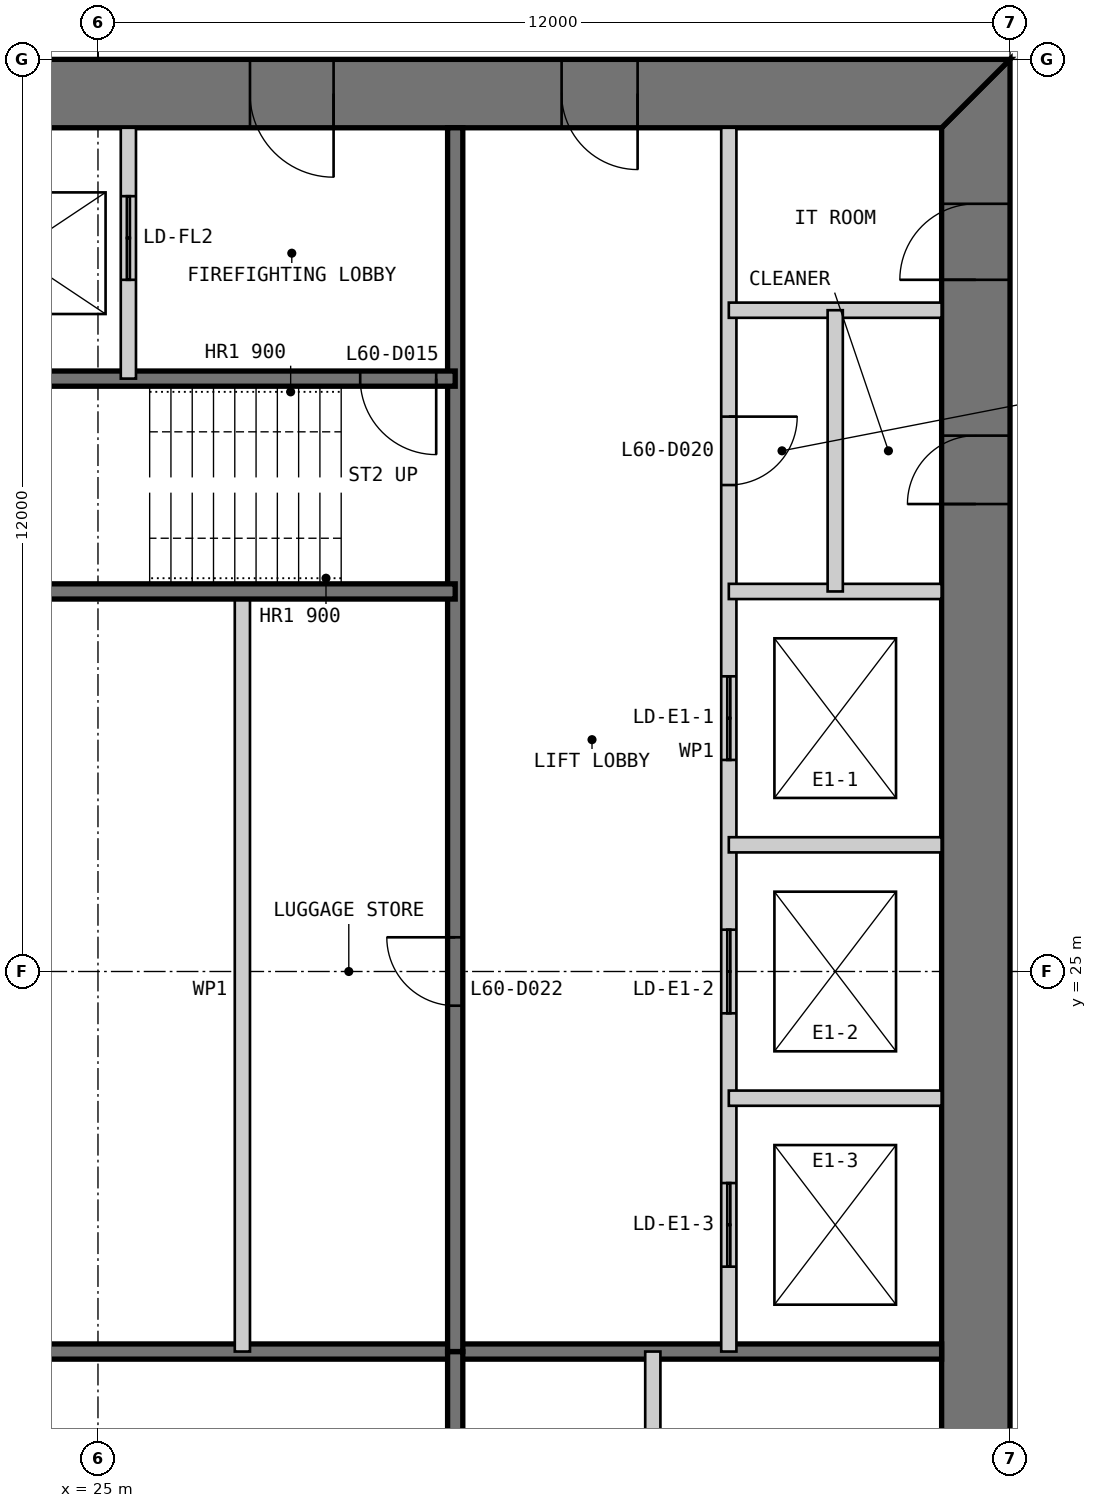
"""IFC4 building model, lengths in metres.
Left out: names, types, materials, properties, quantities, classifications, styles, units other than length and angle.
Written with IfcOpenShell. Run it as: python <this file> out.ifc"""

import sys

from ifc_helpers import new_model, si_unit, direction, frame, frame_2d, origin, place, context, subcontext, project, spatial, polyline, rectangle, outline, extrude, element, fill, save


model = new_model("IFC4")
c1 = context("Model", 3, precision=1e-05, world=origin(), true_north=direction((0.0, 1.0)))
c2 = subcontext(c1, "Body", "Model", "MODEL_VIEW")
j1 = project(units=[si_unit("LENGTHUNIT", "METRE"), si_unit("PLANEANGLEUNIT", "RADIAN")], contexts=[c1])
p1 = place(None, origin())
s1 = spatial("IfcSite", under=j1, at=p1, CompositionType="ELEMENT")
p2 = place(p1, origin())
s2 = spatial("IfcBuilding", under=s1, at=p2, CompositionType="ELEMENT")
p3 = place(p2, frame((0.0, 0.0, 256.0)))
s3 = spatial("IfcBuildingStorey", under=s2, at=p3, CompositionType="ELEMENT", Elevation=256.0)
p4 = place(p3, frame((36.55, 13.9, 0.0), z_axis=(0.0, 0.0, 1.0), x_axis=(0.0, 1.0, 0.0)))
e1 = element("IfcWall", 1, at=p4, inside=s3, PredefinedType="SHEAR", context=c2, shape_type="SweptSolid", body=[
    extrude(outline(polyline([(-0.9, -0.45), (23.1, -0.45), (22.2, 0.45), (0.0, 0.45), (-0.9, -0.45)])), origin(), (0.0, 0.0, 1.0), 3.4),
])
p5 = place(p4, frame((20.2, 0.0, 0.0)))
e2 = element("IfcOpeningElement", 2, at=p5, cuts=e1, PredefinedType="OPENING", context=c2, shape_type="SweptSolid", body=[
    extrude(rectangle(XDim=1.0, YDim=2.2, at=frame_2d((0.5, 1.1))), frame((0.0, 0.46, 0.0), z_axis=(0.0, -1.0, 0.0), x_axis=(1.0, 0.0, 0.0)), (0.0, 0.0, 1.0), 0.92),
])
p6 = place(p4, frame((17.25, 0.0, 0.0)))
e3 = element("IfcOpeningElement", 3, at=p6, cuts=e1, PredefinedType="OPENING", context=c2, shape_type="SweptSolid", body=[
    extrude(rectangle(XDim=0.9, YDim=2.2, at=frame_2d((0.45, 1.1))), frame((0.0, 0.46, 0.0), z_axis=(0.0, -1.0, 0.0), x_axis=(1.0, 0.0, 0.0)), (0.0, 0.0, 1.0), 0.92),
])
p7 = place(p3, frame((37.0, 36.55, 0.0), z_axis=(0.0, 0.0, 1.0), x_axis=(-1.0, 0.0, 0.0)))
e4 = element("IfcWall", 4, at=p7, inside=s3, PredefinedType="SHEAR", context=c2, shape_type="SweptSolid", body=[
    extrude(outline(polyline([(0.0, -0.45), (24.0, -0.45), (23.1, 0.45), (0.9, 0.45), (0.0, -0.45)])), origin(), (0.0, 0.0, 1.0), 3.4),
])
p8 = place(p7, frame((4.9, 0.0, 0.0)))
e5 = element("IfcOpeningElement", 5, at=p8, cuts=e4, PredefinedType="OPENING", context=c2, shape_type="SweptSolid", body=[
    extrude(rectangle(XDim=1.0, YDim=2.2, at=frame_2d((0.5, 1.1))), frame((0.0, 0.46, 0.0), z_axis=(0.0, -1.0, 0.0), x_axis=(1.0, 0.0, 0.0)), (0.0, 0.0, 1.0), 0.92),
])
p9 = place(p7, frame((8.9, 0.0, 0.0)))
e6 = element("IfcOpeningElement", 6, at=p9, cuts=e4, PredefinedType="OPENING", context=c2, shape_type="SweptSolid", body=[
    extrude(rectangle(XDim=1.1, YDim=2.2, at=frame_2d((0.55, 1.1))), frame((0.0, 0.46, 0.0), z_axis=(0.0, -1.0, 0.0), x_axis=(1.0, 0.0, 0.0)), (0.0, 0.0, 1.0), 0.92),
])
p10 = place(p7, frame((15.05, 0.0, 0.0)))
e7 = element("IfcOpeningElement", 7, at=p10, cuts=e4, PredefinedType="OPENING", context=c2, shape_type="SweptSolid", body=[
    extrude(rectangle(XDim=0.9, YDim=2.2, at=frame_2d((0.45, 1.1))), frame((0.0, 0.46, 0.0), z_axis=(0.0, -1.0, 0.0), x_axis=(1.0, 0.0, 0.0)), (0.0, 0.0, 1.0), 0.92),
])
p11 = place(p7, frame((17.9, 0.0, 0.0)))
e8 = element("IfcOpeningElement", 8, at=p11, cuts=e4, PredefinedType="OPENING", context=c2, shape_type="SweptSolid", body=[
    extrude(rectangle(XDim=1.0, YDim=2.2, at=frame_2d((0.5, 1.1))), frame((0.0, 0.46, 0.0), z_axis=(0.0, -1.0, 0.0), x_axis=(1.0, 0.0, 0.0)), (0.0, 0.0, 1.0), 0.92),
])
p12 = place(p7, frame((21.4, 0.0, 0.0)))
e9 = element("IfcOpeningElement", 9, at=p12, cuts=e4, PredefinedType="OPENING", context=c2, shape_type="SweptSolid", body=[
    extrude(rectangle(XDim=1.0, YDim=2.2, at=frame_2d((0.5, 1.1))), frame((0.0, 0.46, 0.0), z_axis=(0.0, -1.0, 0.0), x_axis=(1.0, 0.0, 0.0)), (0.0, 0.0, 1.0), 0.92),
])
p13 = place(p3, frame((20.3, 20.0, 0.0), z_axis=(0.0, 0.0, 1.0), x_axis=(1.0, 0.0, 0.0)))
e10 = element("IfcWall", 10, at=p13, inside=s3, PredefinedType="SOLIDWALL", context=c2, shape_type="SweptSolid", body=[
    extrude(rectangle(XDim=15.8, YDim=0.2, at=frame_2d((7.9, 0.0))), origin(), (0.0, 0.0, 1.0), 3.2),
])
p14 = place(p3, frame((29.7, 13.9, 0.0), z_axis=(0.0, 0.0, 1.0), x_axis=(0.0, 1.0, 0.0)))
e11 = element("IfcWall", 11, at=p14, inside=s3, PredefinedType="SOLIDWALL", context=c2, shape_type="SweptSolid", body=[
    extrude(rectangle(XDim=6.1, YDim=0.2, at=frame_2d((3.05, 0.0))), origin(), (0.0, 0.0, 1.0), 3.2),
])
p15 = place(p3, frame((32.3, 13.9, 0.0), z_axis=(0.0, 0.0, 1.0), x_axis=(0.0, 1.0, 0.0)))
e12 = element("IfcWall", 12, at=p15, inside=s3, PredefinedType="PARTITIONING", context=c2, shape_type="SweptSolid", body=[
    extrude(rectangle(XDim=6.1, YDim=0.2, at=frame_2d((3.05, 0.0))), origin(), (0.0, 0.0, 1.0), 3.2),
])
p16 = place(p3, frame((33.3, 36.1, 0.0), z_axis=(0.0, 0.0, 1.0), x_axis=(0.0, -1.0, 0.0)))
e13 = element("IfcWall", 13, at=p16, inside=s3, PredefinedType="PARTITIONING", context=c2, shape_type="SweptSolid", body=[
    extrude(rectangle(XDim=16.1, YDim=0.2, at=frame_2d((8.05, 0.0))), origin(), (0.0, 0.0, 1.0), 3.2),
])
p17 = place(p16, frame((3.8, 0.0, 0.0)))
e14 = element("IfcOpeningElement", 14, at=p17, cuts=e13, PredefinedType="OPENING", context=c2, shape_type="SweptSolid", body=[
    extrude(rectangle(XDim=0.9, YDim=2.2, at=frame_2d((0.45, 1.1))), frame((0.0, 0.11, 0.0), z_axis=(0.0, -1.0, 0.0), x_axis=(1.0, 0.0, 0.0)), (0.0, 0.0, 1.0), 0.22),
])
p18 = place(p16, frame((7.217, 0.0, 0.0)))
e15 = element("IfcOpeningElement", 15, at=p18, cuts=e13, PredefinedType="OPENING", context=c2, shape_type="SweptSolid", body=[
    extrude(rectangle(XDim=1.1, YDim=2.2, at=frame_2d((0.55, 1.1))), frame((0.0, 0.11, 0.0), z_axis=(0.0, -1.0, 0.0), x_axis=(1.0, 0.0, 0.0)), (0.0, 0.0, 1.0), 0.22),
])
p19 = place(p16, frame((10.55, 0.0, 0.0)))
e16 = element("IfcOpeningElement", 16, at=p19, cuts=e13, PredefinedType="OPENING", context=c2, shape_type="SweptSolid", body=[
    extrude(rectangle(XDim=1.1, YDim=2.2, at=frame_2d((0.55, 1.1))), frame((0.0, 0.11, 0.0), z_axis=(0.0, -1.0, 0.0), x_axis=(1.0, 0.0, 0.0)), (0.0, 0.0, 1.0), 0.22),
])
p20 = place(p16, frame((13.883, 0.0, 0.0)))
e17 = element("IfcOpeningElement", 17, at=p20, cuts=e13, PredefinedType="OPENING", context=c2, shape_type="SweptSolid", body=[
    extrude(rectangle(XDim=1.1, YDim=2.2, at=frame_2d((0.55, 1.1))), frame((0.0, 0.11, 0.0), z_axis=(0.0, -1.0, 0.0), x_axis=(1.0, 0.0, 0.0)), (0.0, 0.0, 1.0), 0.22),
])
p21 = place(p3, frame((29.7, 36.1, 0.0), z_axis=(0.0, 0.0, 1.0), x_axis=(0.0, -1.0, 0.0)))
e18 = element("IfcWall", 18, at=p21, inside=s3, PredefinedType="SOLIDWALL", context=c2, shape_type="SweptSolid", body=[
    extrude(rectangle(XDim=16.1, YDim=0.2, at=frame_2d((8.05, 0.0))), origin(), (0.0, 0.0, 1.0), 3.2),
])
p22 = place(p21, frame((10.65, 0.0, 0.0)))
e19 = element("IfcOpeningElement", 19, at=p22, cuts=e18, PredefinedType="OPENING", context=c2, shape_type="SweptSolid", body=[
    extrude(rectangle(XDim=0.9, YDim=2.2, at=frame_2d((0.45, 1.1))), frame((0.0, 0.11, 0.0), z_axis=(0.0, -1.0, 0.0), x_axis=(1.0, 0.0, 0.0)), (0.0, 0.0, 1.0), 0.22),
])
for number, where, z_axis, x_axis in (
    (20, (36.1, 30.0, 0.0), (0.0, 0.0, 1.0), (-1.0, 0.0, 0.0)),
    (21, (36.1, 26.667, 0.0), (0.0, 0.0, 1.0), (-1.0, 0.0, 0.0)),
    (22, (36.1, 23.333, 0.0), (0.0, 0.0, 1.0), (-1.0, 0.0, 0.0)),
):
    element("IfcWall", number, at=place(p3, frame(where, z_axis=z_axis, x_axis=x_axis)), inside=s3, PredefinedType="PARTITIONING", context=c2, shape_type="SweptSolid", body=[
        extrude(rectangle(XDim=2.8, YDim=0.2, at=frame_2d((1.4, 0.0))), origin(), (0.0, 0.0, 1.0), 3.2),
    ])
p23 = place(p3, frame((26.9, 30.0, 0.0), z_axis=(0.0, 0.0, 1.0), x_axis=(0.0, -1.0, 0.0)))
e23 = element("IfcWall", 23, at=p23, inside=s3, PredefinedType="PARTITIONING", context=c2, shape_type="SweptSolid", body=[
    extrude(rectangle(XDim=10.0, YDim=0.2, at=frame_2d((5.0, 0.0))), origin(), (0.0, 0.0, 1.0), 3.2),
])
p24 = place(p3, frame((29.7, 32.8, 0.0), z_axis=(0.0, 0.0, 1.0), x_axis=(-1.0, 0.0, 0.0)))
e24 = element("IfcWall", 24, at=p24, inside=s3, PredefinedType="SOLIDWALL", context=c2, shape_type="SweptSolid", body=[
    extrude(rectangle(XDim=9.4, YDim=0.2, at=frame_2d((4.7, 0.0))), origin(), (0.0, 0.0, 1.0), 3.2),
])
p25 = place(p24, frame((0.25, 0.0, 0.0)))
e25 = element("IfcOpeningElement", 25, at=p25, cuts=e24, PredefinedType="OPENING", context=c2, shape_type="SweptSolid", body=[
    extrude(rectangle(XDim=1.0, YDim=2.2, at=frame_2d((0.5, 1.1))), frame((0.0, 0.11, 0.0), z_axis=(0.0, -1.0, 0.0), x_axis=(1.0, 0.0, 0.0)), (0.0, 0.0, 1.0), 0.22),
])
p26 = place(p3, frame((29.7, 30.0, 0.0), z_axis=(0.0, 0.0, 1.0), x_axis=(-1.0, 0.0, 0.0)))
e26 = element("IfcWall", 26, at=p26, inside=s3, PredefinedType="SOLIDWALL", context=c2, shape_type="SweptSolid", body=[
    extrude(rectangle(XDim=15.8, YDim=0.2, at=frame_2d((7.9, 0.0))), origin(), (0.0, 0.0, 1.0), 3.2),
])
p27 = place(p3, frame((25.4, 36.1, 0.0), z_axis=(0.0, 0.0, 1.0), x_axis=(0.0, -1.0, 0.0)))
e27 = element("IfcWall", 27, at=p27, inside=s3, PredefinedType="PARTITIONING", context=c2, shape_type="SweptSolid", body=[
    extrude(rectangle(XDim=3.3, YDim=0.2, at=frame_2d((1.65, 0.0))), origin(), (0.0, 0.0, 1.0), 3.2),
])
p28 = place(p27, frame((0.9, 0.0, 0.0)))
e28 = element("IfcOpeningElement", 28, at=p28, cuts=e27, PredefinedType="OPENING", context=c2, shape_type="SweptSolid", body=[
    extrude(rectangle(XDim=1.1, YDim=2.2, at=frame_2d((0.55, 1.1))), frame((0.0, 0.11, 0.0), z_axis=(0.0, -1.0, 0.0), x_axis=(1.0, 0.0, 0.0)), (0.0, 0.0, 1.0), 0.22),
])
p29 = place(p3, frame((36.1, 33.7, 0.0), z_axis=(0.0, 0.0, 1.0), x_axis=(-1.0, 0.0, 0.0)))
e29 = element("IfcWall", 29, at=p29, inside=s3, PredefinedType="PARTITIONING", context=c2, shape_type="SweptSolid", body=[
    extrude(rectangle(XDim=2.8, YDim=0.2, at=frame_2d((1.4, 0.0))), origin(), (0.0, 0.0, 1.0), 3.2),
])
p30 = place(p3, frame((34.7, 33.7, 0.0), z_axis=(0.0, 0.0, 1.0), x_axis=(0.0, -1.0, 0.0)))
e30 = element("IfcWall", 30, at=p30, inside=s3, PredefinedType="PARTITIONING", context=c2, shape_type="SweptSolid", body=[
    extrude(rectangle(XDim=3.7, YDim=0.2, at=frame_2d((1.85, 0.0))), origin(), (0.0, 0.0, 1.0), 3.2),
])
p31 = place(p8, origin())
e31 = element("IfcDoor", 31, at=p31, inside=s3, OperationType="SINGLE_SWING_LEFT", PredefinedType="DOOR", context=c2, shape_type="SweptSolid", body=[
    extrude(rectangle(XDim=1.0, YDim=2.2, at=frame_2d((0.5, 1.1))), frame((0.0, 0.025, 0.0), z_axis=(0.0, -1.0, 0.0), x_axis=(1.0, 0.0, 0.0)), (0.0, 0.0, 1.0), 0.05),
    extrude(outline(polyline([(0.0, 0.0), (0.04, 0.0), (0.04, 2.16), (0.96, 2.16), (0.96, 0.0), (1.0, 0.0), (1.0, 2.2), (0.0, 2.2), (0.0, 0.0)])), frame((0.0, 0.3, 0.0), z_axis=(0.0, -1.0, 0.0), x_axis=(1.0, 0.0, 0.0)), (0.0, 0.0, 1.0), 0.6),
])
fill(e5, e31)
p32 = place(p9, origin())
e32 = element("IfcDoor", 32, at=p32, inside=s3, OperationType="SINGLE_SWING_LEFT", PredefinedType="DOOR", context=c2, shape_type="SweptSolid", body=[
    extrude(rectangle(XDim=1.1, YDim=2.2, at=frame_2d((0.55, 1.1))), frame((0.0, 0.025, 0.0), z_axis=(0.0, -1.0, 0.0), x_axis=(1.0, 0.0, 0.0)), (0.0, 0.0, 1.0), 0.05),
    extrude(outline(polyline([(0.0, 0.0), (0.04, 0.0), (0.04, 2.16), (1.06, 2.16), (1.06, 0.0), (1.1, 0.0), (1.1, 2.2), (0.0, 2.2), (0.0, 0.0)])), frame((0.0, 0.3, 0.0), z_axis=(0.0, -1.0, 0.0), x_axis=(1.0, 0.0, 0.0)), (0.0, 0.0, 1.0), 0.6),
])
fill(e6, e32)
p33 = place(p25, origin())
e33 = element("IfcDoor", 33, at=p33, inside=s3, OperationType="SINGLE_SWING_LEFT", PredefinedType="DOOR", context=c2, shape_type="SweptSolid", body=[
    extrude(rectangle(XDim=1.0, YDim=2.2, at=frame_2d((0.5, 1.1))), frame((0.0, 0.025, 0.0), z_axis=(0.0, -1.0, 0.0), x_axis=(1.0, 0.0, 0.0)), (0.0, 0.0, 1.0), 0.05),
])
fill(e25, e33)
p34 = place(p5, origin())
e34 = element("IfcDoor", 34, at=p34, inside=s3, OperationType="SINGLE_SWING_LEFT", PredefinedType="DOOR", context=c2, shape_type="SweptSolid", body=[
    extrude(rectangle(XDim=1.0, YDim=2.2, at=frame_2d((0.5, 1.1))), frame((0.0, 0.025, 0.0), z_axis=(0.0, -1.0, 0.0), x_axis=(1.0, 0.0, 0.0)), (0.0, 0.0, 1.0), 0.05),
    extrude(outline(polyline([(0.0, 0.0), (0.04, 0.0), (0.04, 2.16), (0.96, 2.16), (0.96, 0.0), (1.0, 0.0), (1.0, 2.2), (0.0, 2.2), (0.0, 0.0)])), frame((0.0, 0.3, 0.0), z_axis=(0.0, -1.0, 0.0), x_axis=(1.0, 0.0, 0.0)), (0.0, 0.0, 1.0), 0.6),
])
fill(e2, e34)
p35 = place(p17, origin())
e35 = element("IfcDoor", 35, at=p35, inside=s3, OperationType="SINGLE_SWING_LEFT", PredefinedType="DOOR", context=c2, shape_type="SweptSolid", body=[
    extrude(rectangle(XDim=0.9, YDim=2.2, at=frame_2d((0.45, 1.1))), frame((0.0, 0.025, 0.0), z_axis=(0.0, -1.0, 0.0), x_axis=(1.0, 0.0, 0.0)), (0.0, 0.0, 1.0), 0.05),
])
fill(e14, e35)
p36 = place(p6, origin())
e36 = element("IfcDoor", 36, at=p36, inside=s3, OperationType="SINGLE_SWING_LEFT", PredefinedType="DOOR", context=c2, shape_type="SweptSolid", body=[
    extrude(rectangle(XDim=0.9, YDim=2.2, at=frame_2d((0.45, 1.1))), frame((0.0, 0.025, 0.0), z_axis=(0.0, -1.0, 0.0), x_axis=(1.0, 0.0, 0.0)), (0.0, 0.0, 1.0), 0.05),
    extrude(outline(polyline([(0.0, 0.0), (0.04, 0.0), (0.04, 2.16), (0.86, 2.16), (0.86, 0.0), (0.9, 0.0), (0.9, 2.2), (0.0, 2.2), (0.0, 0.0)])), frame((0.0, 0.3, 0.0), z_axis=(0.0, -1.0, 0.0), x_axis=(1.0, 0.0, 0.0)), (0.0, 0.0, 1.0), 0.6),
])
fill(e3, e36)
p37 = place(p22, frame((0.9, 0.0, 0.0), z_axis=(0.0, 0.0, 1.0), x_axis=(-1.0, 0.0, 0.0)))
e37 = element("IfcDoor", 37, at=p37, inside=s3, OperationType="SINGLE_SWING_RIGHT", PredefinedType="DOOR", context=c2, shape_type="SweptSolid", body=[
    extrude(rectangle(XDim=0.9, YDim=2.2, at=frame_2d((0.45, 1.1))), frame((0.0, 0.025, 0.0), z_axis=(0.0, -1.0, 0.0), x_axis=(1.0, 0.0, 0.0)), (0.0, 0.0, 1.0), 0.05),
])
fill(e19, e37)
p38 = place(p28, origin())
e38 = element("IfcDoor", 38, at=p38, inside=s3, OperationType="DOUBLE_DOOR_SLIDING", PredefinedType="DOOR", context=c2, shape_type="SweptSolid", body=[
    extrude(rectangle(XDim=1.1, YDim=2.2, at=frame_2d((0.55, 1.1))), frame((0.0, 0.025, 0.0), z_axis=(0.0, -1.0, 0.0), x_axis=(1.0, 0.0, 0.0)), (0.0, 0.0, 1.0), 0.05),
])
fill(e28, e38)
p39 = place(p18, origin())
e39 = element("IfcDoor", 39, at=p39, inside=s3, OperationType="DOUBLE_DOOR_SLIDING", PredefinedType="DOOR", context=c2, shape_type="SweptSolid", body=[
    extrude(rectangle(XDim=1.1, YDim=2.2, at=frame_2d((0.55, 1.1))), frame((0.0, 0.025, 0.0), z_axis=(0.0, -1.0, 0.0), x_axis=(1.0, 0.0, 0.0)), (0.0, 0.0, 1.0), 0.05),
])
fill(e15, e39)
p40 = place(p19, origin())
e40 = element("IfcDoor", 40, at=p40, inside=s3, OperationType="DOUBLE_DOOR_SLIDING", PredefinedType="DOOR", context=c2, shape_type="SweptSolid", body=[
    extrude(rectangle(XDim=1.1, YDim=2.2, at=frame_2d((0.55, 1.1))), frame((0.0, 0.025, 0.0), z_axis=(0.0, -1.0, 0.0), x_axis=(1.0, 0.0, 0.0)), (0.0, 0.0, 1.0), 0.05),
])
fill(e16, e40)
p41 = place(p20, origin())
e41 = element("IfcDoor", 41, at=p41, inside=s3, OperationType="DOUBLE_DOOR_SLIDING", PredefinedType="DOOR", context=c2, shape_type="SweptSolid", body=[
    extrude(rectangle(XDim=1.1, YDim=2.2, at=frame_2d((0.55, 1.1))), frame((0.0, 0.025, 0.0), z_axis=(0.0, -1.0, 0.0), x_axis=(1.0, 0.0, 0.0)), (0.0, 0.0, 1.0), 0.05),
])
fill(e17, e41)
save(model, sys.argv[1])
